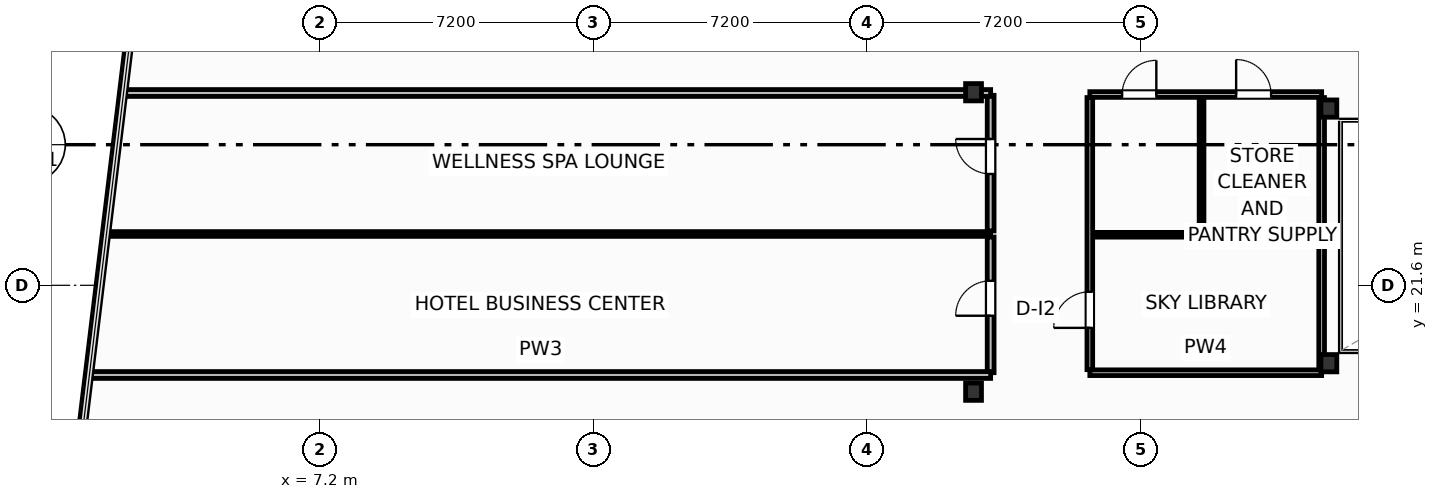
"""IFC4 building model, lengths in metres.
Left out: names, types, materials, properties, quantities, classifications, styles, units other than length and angle.
Written with IfcOpenShell. Run it as: python <this file> out.ifc"""

import sys

from ifc_helpers import new_model, si_unit, direction, frame, frame_2d, origin, origin_2d, place, context, subcontext, project, spatial, rectangle, i_section, extrude, element, fill, save


model = new_model("IFC4")
c1 = context("Model", 3, precision=1e-05, world=origin(), true_north=direction((0.0, 1.0)))
c2 = subcontext(c1, "Body", "Model", "MODEL_VIEW")
j1 = project(units=[si_unit("LENGTHUNIT", "METRE"), si_unit("PLANEANGLEUNIT", "RADIAN")], contexts=[c1])
p1 = place(None, origin())
s1 = spatial("IfcSite", under=j1, at=p1, CompositionType="ELEMENT")
p2 = place(p1, origin())
s2 = spatial("IfcBuilding", under=s1, at=p2, CompositionType="ELEMENT")
p3 = place(p2, frame((0.0, 0.0, 143.9)))
s3 = spatial("IfcBuildingStorey", under=s2, at=p3, CompositionType="ELEMENT", Elevation=143.9)
for number, where, z_axis, x_axis in (
    (1, (33.75, 19.55, 0.0), (0.0, 0.0, 1.0), (1.0, 0.0, 0.0)),
    (2, (33.75, 26.25, 0.0), (0.0, 0.0, 1.0), (1.0, 0.0, 0.0)),
    (3, (24.4, 18.8, 0.0), (0.0, 0.0, 1.0), (1.0, 0.0, 0.0)),
    (4, (24.4, 26.68, 0.0), (0.0, 0.0, 1.0), (1.0, 0.0, 0.0)),
):
    element("IfcColumn", number, at=place(p3, frame(where, z_axis=z_axis, x_axis=x_axis)), inside=s3, PredefinedType="COLUMN", context=c2, shape_type="SweptSolid", body=[
        extrude(i_section(OverallWidth=0.418, OverallDepth=0.455, WebThickness=0.042, FlangeThickness=0.068, FilletRadius=0.025, at=origin_2d()), origin(), (0.0, 0.0, 1.0), 3.7),
    ])
p4 = place(p3, frame((24.85, 19.3, 0.0), z_axis=(0.0, 0.0, 1.0), x_axis=(0.0, 1.0, 0.0)))
e5 = element("IfcWall", 5, at=p4, inside=s3, PredefinedType="PARTITIONING", context=c2, shape_type="SweptSolid", body=[
    extrude(rectangle(XDim=3.57, YDim=0.18, at=frame_2d((1.785, 0.0))), origin(), (0.0, 0.0, 1.0), 3.45),
])
p5 = place(p4, frame((1.5, 0.0, 0.0)))
e6 = element("IfcOpeningElement", 6, at=p5, cuts=e5, PredefinedType="OPENING", context=c2, shape_type="SweptSolid", body=[
    extrude(rectangle(XDim=0.92, YDim=2.05, at=frame_2d((0.46, 1.025))), frame((0.0, 0.1, 0.0), z_axis=(0.0, -1.0, 0.0), x_axis=(1.0, 0.0, 0.0)), (0.0, 0.0, 1.0), 0.2),
])
p6 = place(p3, frame((24.85, 23.03, 0.0), z_axis=(0.0, 0.0, 1.0), x_axis=(0.0, 1.0, 0.0)))
e7 = element("IfcWall", 7, at=p6, inside=s3, PredefinedType="PARTITIONING", context=c2, shape_type="SweptSolid", body=[
    extrude(rectangle(XDim=3.57, YDim=0.18, at=frame_2d((1.785, 0.0))), origin(), (0.0, 0.0, 1.0), 3.45),
])
p7 = place(p6, frame((1.5, 0.0, 0.0)))
e8 = element("IfcOpeningElement", 8, at=p7, cuts=e7, PredefinedType="OPENING", context=c2, shape_type="SweptSolid", body=[
    extrude(rectangle(XDim=0.92, YDim=2.05, at=frame_2d((0.46, 1.025))), frame((0.0, 0.1, 0.0), z_axis=(0.0, -1.0, 0.0), x_axis=(1.0, 0.0, 0.0)), (0.0, 0.0, 1.0), 0.2),
])
p8 = place(p3, frame((1.624, 22.95, 0.0), z_axis=(0.0, 0.0, 1.0), x_axis=(1.0, 0.0, 0.0)))
e9 = element("IfcWall", 9, at=p8, inside=s3, PredefinedType="PARTITIONING", context=c2, shape_type="SweptSolid", body=[
    extrude(rectangle(XDim=23.226, YDim=0.125, at=frame_2d((11.613, 0.0))), origin(), (0.0, 0.0, 1.0), 3.45),
])
p9 = place(p3, frame((1.174, 19.24, 0.0), z_axis=(0.0, 0.0, 1.0), x_axis=(1.0, 0.0, 0.0)))
e10 = element("IfcWall", 10, at=p9, inside=s3, PredefinedType="PARTITIONING", context=c2, shape_type="SweptSolid", body=[
    extrude(rectangle(XDim=23.676, YDim=0.18, at=frame_2d((11.838, 0.0))), origin(), (0.0, 0.0, 1.0), 3.45),
])
p10 = place(p3, frame((2.073, 26.66, 0.0), z_axis=(0.0, 0.0, 1.0), x_axis=(1.0, 0.0, 0.0)))
e11 = element("IfcWall", 11, at=p10, inside=s3, PredefinedType="PARTITIONING", context=c2, shape_type="SweptSolid", body=[
    extrude(rectangle(XDim=22.777, YDim=0.18, at=frame_2d((11.388, 0.0))), origin(), (0.0, 0.0, 1.0), 2.662),
])
p11 = place(p3, frame((27.46, 19.3, 0.0), z_axis=(0.0, 0.0, 1.0), x_axis=(1.0, 0.0, 0.0)))
e12 = element("IfcWall", 12, at=p11, inside=s3, PredefinedType="PARTITIONING", context=c2, shape_type="SweptSolid", body=[
    extrude(rectangle(XDim=6.1, YDim=0.15, at=frame_2d((3.05, 0.0))), origin(), (0.0, 0.0, 1.0), 2.662),
])
p12 = place(p3, frame((27.46, 26.62, 0.0), z_axis=(0.0, 0.0, 1.0), x_axis=(1.0, 0.0, 0.0)))
e13 = element("IfcWall", 13, at=p12, inside=s3, PredefinedType="PARTITIONING", context=c2, shape_type="SweptSolid", body=[
    extrude(rectangle(XDim=6.1, YDim=0.15, at=frame_2d((3.05, 0.0))), origin(), (0.0, 0.0, 1.0), 2.662),
])
p13 = place(p12, frame((0.85, 0.0, 0.0)))
e14 = element("IfcOpeningElement", 14, at=p13, cuts=e13, PredefinedType="OPENING", context=c2, shape_type="SweptSolid", body=[
    extrude(rectangle(XDim=0.9, YDim=2.05, at=frame_2d((0.45, 1.025))), frame((0.0, 0.085, 0.0), z_axis=(0.0, -1.0, 0.0), x_axis=(1.0, 0.0, 0.0)), (0.0, 0.0, 1.0), 0.17),
])
p14 = place(p12, frame((3.85, 0.0, 0.0)))
e15 = element("IfcOpeningElement", 15, at=p14, cuts=e13, PredefinedType="OPENING", context=c2, shape_type="SweptSolid", body=[
    extrude(rectangle(XDim=0.92, YDim=2.05, at=frame_2d((0.46, 1.025))), frame((0.0, 0.085, 0.0), z_axis=(0.0, -1.0, 0.0), x_axis=(1.0, 0.0, 0.0)), (0.0, 0.0, 1.0), 0.17),
])
p15 = place(p3, frame((27.52, 22.93, 0.0), z_axis=(0.0, 0.0, 1.0), x_axis=(1.0, 0.0, 0.0)))
e16 = element("IfcWall", 16, at=p15, inside=s3, PredefinedType="PARTITIONING", context=c2, shape_type="SweptSolid", body=[
    extrude(rectangle(XDim=6.0, YDim=0.125, at=frame_2d((3.0, 0.0))), origin(), (0.0, 0.0, 1.0), 3.45),
])
p16 = place(p3, frame((30.4, 23.0, 0.0), z_axis=(0.0, 0.0, 1.0), x_axis=(0.0, 1.0, 0.0)))
e17 = element("IfcWall", 17, at=p16, inside=s3, PredefinedType="PARTITIONING", context=c2, shape_type="SweptSolid", body=[
    extrude(rectangle(XDim=3.54, YDim=0.125, at=frame_2d((1.77, 0.0))), origin(), (0.0, 0.0, 1.0), 3.45),
])
p17 = place(p3, frame((27.46, 19.38, 0.0), z_axis=(0.0, 0.0, 1.0), x_axis=(0.0, 1.0, 0.0)))
e18 = element("IfcWall", 18, at=p17, inside=s3, PredefinedType="PARTITIONING", context=c2, shape_type="SweptSolid", body=[
    extrude(rectangle(XDim=7.16, YDim=0.15, at=frame_2d((3.58, 0.0))), origin(), (0.0, 0.0, 1.0), 3.45),
])
p18 = place(p17, frame((1.1, 0.0, 0.0)))
e19 = element("IfcOpeningElement", 19, at=p18, cuts=e18, PredefinedType="OPENING", context=c2, shape_type="SweptSolid", body=[
    extrude(rectangle(XDim=0.95, YDim=2.05, at=frame_2d((0.475, 1.025))), frame((0.0, 0.085, 0.0), z_axis=(0.0, -1.0, 0.0), x_axis=(1.0, 0.0, 0.0)), (0.0, 0.0, 1.0), 0.17),
])
p19 = place(p3, frame((33.56, 19.38, 0.0), z_axis=(0.0, 0.0, 1.0), x_axis=(0.0, 1.0, 0.0)))
e20 = element("IfcWall", 20, at=p19, inside=s3, PredefinedType="PARTITIONING", context=c2, shape_type="SweptSolid", body=[
    extrude(rectangle(XDim=7.16, YDim=0.15, at=frame_2d((3.58, 0.0))), origin(), (0.0, 0.0, 1.0), 2.824),
])
p20 = place(p5, origin())
e21 = element("IfcDoor", 21, at=p20, inside=s3, OperationType="SINGLE_SWING_LEFT", PredefinedType="DOOR", context=c2, shape_type="SweptSolid", body=[
    extrude(rectangle(XDim=0.92, YDim=2.05, at=frame_2d((0.46, 1.025))), frame((0.0, 0.025, 0.0), z_axis=(0.0, -1.0, 0.0), x_axis=(1.0, 0.0, 0.0)), (0.0, 0.0, 1.0), 0.05),
])
fill(e6, e21)
p21 = place(p7, origin())
e22 = element("IfcDoor", 22, at=p21, inside=s3, OperationType="SINGLE_SWING_RIGHT", PredefinedType="DOOR", context=c2, shape_type="SweptSolid", body=[
    extrude(rectangle(XDim=0.92, YDim=2.05, at=frame_2d((0.46, 1.025))), frame((0.0, 0.025, 0.0), z_axis=(0.0, -1.0, 0.0), x_axis=(1.0, 0.0, 0.0)), (0.0, 0.0, 1.0), 0.05),
])
fill(e8, e22)
p22 = place(p13, origin())
e23 = element("IfcDoor", 23, at=p22, inside=s3, OperationType="SINGLE_SWING_RIGHT", PredefinedType="DOOR", context=c2, shape_type="SweptSolid", body=[
    extrude(rectangle(XDim=0.9, YDim=2.05, at=frame_2d((0.45, 1.025))), frame((0.0, 0.025, 0.0), z_axis=(0.0, -1.0, 0.0), x_axis=(1.0, 0.0, 0.0)), (0.0, 0.0, 1.0), 0.05),
])
fill(e14, e23)
p23 = place(p14, origin())
e24 = element("IfcDoor", 24, at=p23, inside=s3, OperationType="SINGLE_SWING_LEFT", PredefinedType="DOOR", context=c2, shape_type="SweptSolid", body=[
    extrude(rectangle(XDim=0.92, YDim=2.05, at=frame_2d((0.46, 1.025))), frame((0.0, 0.025, 0.0), z_axis=(0.0, -1.0, 0.0), x_axis=(1.0, 0.0, 0.0)), (0.0, 0.0, 1.0), 0.05),
])
fill(e15, e24)
p24 = place(p18, origin())
e25 = element("IfcDoor", 25, at=p24, inside=s3, OperationType="SINGLE_SWING_LEFT", PredefinedType="DOOR", context=c2, shape_type="SweptSolid", body=[
    extrude(rectangle(XDim=0.95, YDim=2.05, at=frame_2d((0.475, 1.025))), frame((0.0, 0.025, 0.0), z_axis=(0.0, -1.0, 0.0), x_axis=(1.0, 0.0, 0.0)), (0.0, 0.0, 1.0), 0.05),
])
fill(e19, e25)
save(model, sys.argv[1])
